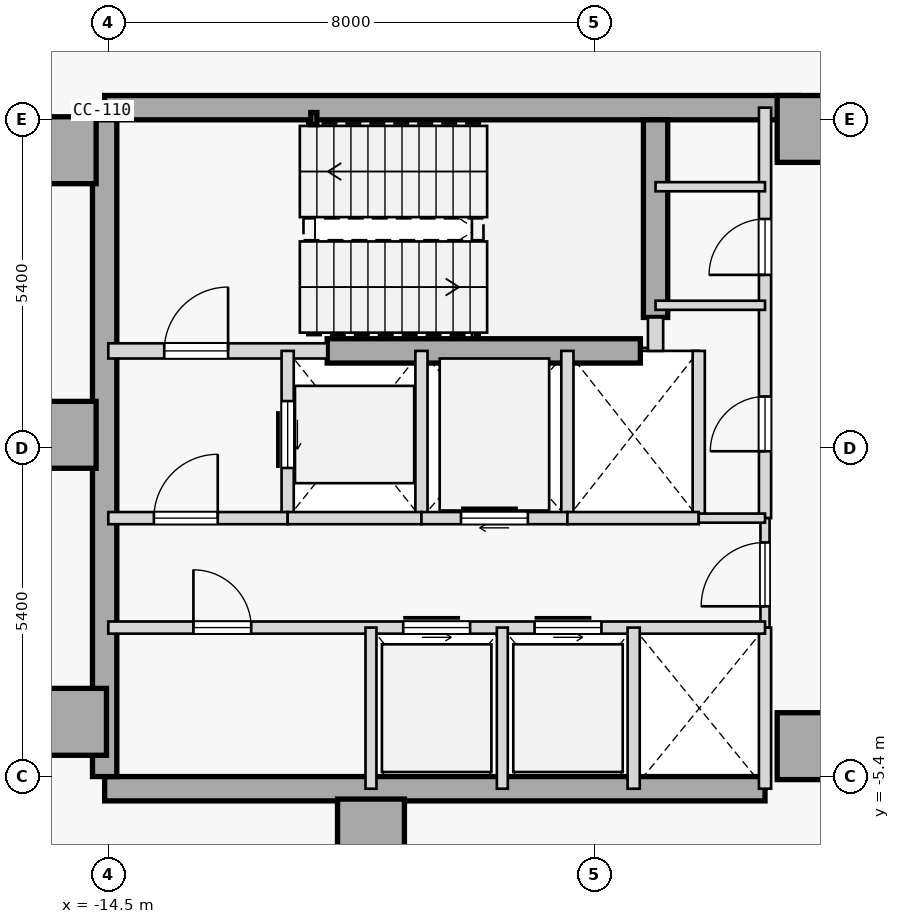
"""IFC4 building model, lengths in metres.
Left out: names, types, materials, properties, quantities, classifications, styles, units other than length and angle.
Written with IfcOpenShell. Run it as: python <this file> out.ifc"""

import sys

from ifc_helpers import new_model, si_unit, direction, frame, frame_2d, origin, origin_2d, place, context, subcontext, project, spatial, rectangle, hollow_rectangle, extrude, element, fill, save


model = new_model("IFC4")
c1 = context("Model", 3, precision=1e-05, world=origin(), true_north=direction((0.0, 1.0)))
c2 = subcontext(c1, "Body", "Model", "MODEL_VIEW")
j1 = project(units=[si_unit("LENGTHUNIT", "METRE"), si_unit("PLANEANGLEUNIT", "RADIAN")], contexts=[c1])
p1 = place(None, origin())
s1 = spatial("IfcSite", under=j1, at=p1, CompositionType="ELEMENT")
p2 = place(p1, origin())
s2 = spatial("IfcBuilding", under=s1, at=p2, CompositionType="ELEMENT")
p3 = place(p2, frame((0.0, 0.0, 147.3)))
s3 = spatial("IfcBuildingStorey", under=s2, at=p3, CompositionType="ELEMENT", Elevation=147.3)
for number, where, z_axis, x_axis in (
    (1, (-15.25, 4.9, 0.0), (0.0, 0.0, 1.0), (1.0, 0.0, 0.0)),
    (2, (-15.25, 0.22, 0.0), (0.0, 0.0, 1.0), (1.0, 0.0, 0.0)),
    (3, (-15.08, -4.5, 0.0), (0.0, 0.0, 1.0), (1.0, 0.0, 0.0)),
    (4, (-10.18, -6.32, 0.0), (0.0, 0.0, 1.0), (1.0, 0.0, 0.0)),
    (5, (-2.95, -4.9, 0.0), (0.0, 0.0, 1.0), (1.0, 0.0, 0.0)),
    (6, (-2.95, 5.25, 0.0), (0.0, 0.0, 1.0), (1.0, 0.0, 0.0)),
):
    element("IfcColumn", number, at=place(p3, frame(where, z_axis=z_axis, x_axis=x_axis)), inside=s3, PredefinedType="COLUMN", context=c2, shape_type="SweptSolid", body=[
        extrude(rectangle(XDim=1.1, YDim=1.1, at=origin_2d()), origin(), (0.0, 0.0, 1.0), 4.1),
    ])
p4 = place(p3, frame((-14.56, 5.6, 0.0), z_axis=(0.0, 0.0, 1.0), x_axis=(1.0, 0.0, 0.0)))
e7 = element("IfcWall", 7, at=p4, inside=s3, PredefinedType="SHEAR", context=c2, shape_type="SweptSolid", body=[
    extrude(rectangle(XDim=11.41, YDim=0.4, at=frame_2d((5.705, 0.0))), origin(), (0.0, 0.0, 1.0), 3.875),
])
p5 = place(p3, frame((-14.56, -5.6, 0.0), z_axis=(0.0, 0.0, 1.0), x_axis=(1.0, 0.0, 0.0)))
e8 = element("IfcWall", 8, at=p5, inside=s3, PredefinedType="SHEAR", context=c2, shape_type="SweptSolid", body=[
    extrude(rectangle(XDim=10.86, YDim=0.4, at=frame_2d((5.43, 0.0))), origin(), (0.0, 0.0, 1.0), 3.875),
])
p6 = place(p3, frame((-14.56, -5.4, 0.0), z_axis=(0.0, 0.0, 1.0), x_axis=(0.0, 1.0, 0.0)))
e9 = element("IfcWall", 9, at=p6, inside=s3, PredefinedType="SHEAR", context=c2, shape_type="SweptSolid", body=[
    extrude(rectangle(XDim=10.8, YDim=0.4, at=frame_2d((5.4, 0.0))), origin(), (0.0, 0.0, 1.0), 3.875),
])
p7 = place(p3, frame((-5.5, 2.15, 0.0), z_axis=(0.0, 0.0, 1.0), x_axis=(0.0, 1.0, 0.0)))
e10 = element("IfcWall", 10, at=p7, inside=s3, PredefinedType="SHEAR", context=c2, shape_type="SweptSolid", body=[
    extrude(rectangle(XDim=3.25, YDim=0.4, at=frame_2d((1.625, 0.0))), origin(), (0.0, 0.0, 1.0), 3.875),
])
p8 = place(p3, frame((-10.9, 1.6, 0.0), z_axis=(0.0, 0.0, 1.0), x_axis=(1.0, 0.0, 0.0)))
e11 = element("IfcWall", 11, at=p8, inside=s3, PredefinedType="SHEAR", context=c2, shape_type="SweptSolid", body=[
    extrude(rectangle(XDim=5.15, YDim=0.4, at=frame_2d((2.575, 0.0))), origin(), (0.0, 0.0, 1.0), 3.875),
])
p9 = place(p3, frame((-11.12, 5.42, 0.0), z_axis=(0.0, 0.0, 1.0), x_axis=(1.0, 0.0, 0.0)))
e12 = element("IfcColumn", 12, at=p9, inside=s3, PredefinedType="COLUMN", context=c2, shape_type="SweptSolid", body=[
    extrude(hollow_rectangle(XDim=0.1, YDim=0.2, WallThickness=0.008, at=origin_2d()), origin(), (0.0, 0.0, 1.0), 4.1),
])
p10 = place(p3, frame((-14.5, 1.6, 0.0), z_axis=(0.0, 0.0, 1.0), x_axis=(1.0, 0.0, 0.0)))
e13 = element("IfcWall", 13, at=p10, inside=s3, PredefinedType="STANDARD", context=c2, shape_type="SweptSolid", body=[
    extrude(rectangle(XDim=3.6, YDim=0.25, at=frame_2d((1.8, 0.0))), origin(), (0.0, 0.0, 1.0), 3.875),
])
p11 = place(p10, frame((0.92, 0.0, 0.0)))
e14 = element("IfcOpeningElement", 14, at=p11, cuts=e13, PredefinedType="OPENING", context=c2, shape_type="SweptSolid", body=[
    extrude(rectangle(XDim=1.05, YDim=2.15, at=frame_2d((0.525, 1.075))), frame((0.0, 0.135, 0.0), z_axis=(0.0, -1.0, 0.0), x_axis=(1.0, 0.0, 0.0)), (0.0, 0.0, 1.0), 0.27),
])
p12 = place(p3, frame((-5.5, 1.6, 0.0), z_axis=(0.0, 0.0, 1.0), x_axis=(0.0, 1.0, 0.0)))
e15 = element("IfcWall", 15, at=p12, inside=s3, PredefinedType="STANDARD", context=c2, shape_type="SweptSolid", body=[
    extrude(rectangle(XDim=0.55, YDim=0.25, at=frame_2d((0.275, 0.0))), origin(), (0.0, 0.0, 1.0), 3.875),
])
p13 = place(p3, frame((-3.7, -1.15, 0.0), z_axis=(0.0, 0.0, 1.0), x_axis=(0.0, 1.0, 0.0)))
e16 = element("IfcWall", 16, at=p13, inside=s3, PredefinedType="STANDARD", context=c2, shape_type="SweptSolid", body=[
    extrude(rectangle(XDim=6.75, YDim=0.2, at=frame_2d((3.375, 0.0))), origin(), (0.0, 0.0, 1.0), 3.875),
])
p14 = place(p13, frame((1.1, 0.0, 0.0)))
e17 = element("IfcOpeningElement", 17, at=p14, cuts=e16, PredefinedType="OPENING", context=c2, shape_type="SweptSolid", body=[
    extrude(rectangle(XDim=0.9, YDim=2.15, at=frame_2d((0.45, 1.075))), frame((0.0, 0.11, 0.0), z_axis=(0.0, -1.0, 0.0), x_axis=(1.0, 0.0, 0.0)), (0.0, 0.0, 1.0), 0.22),
])
p15 = place(p13, frame((4.0, 0.0, 0.0)))
e18 = element("IfcOpeningElement", 18, at=p15, cuts=e16, PredefinedType="OPENING", context=c2, shape_type="SweptSolid", body=[
    extrude(rectangle(XDim=0.92, YDim=2.15, at=frame_2d((0.46, 1.075))), frame((0.0, 0.11, 0.0), z_axis=(0.0, -1.0, 0.0), x_axis=(1.0, 0.0, 0.0)), (0.0, 0.0, 1.0), 0.22),
])
p16 = place(p3, frame((-3.7, -2.95, 0.0), z_axis=(0.0, 0.0, 1.0), x_axis=(0.0, 1.0, 0.0)))
e19 = element("IfcWall", 19, at=p16, inside=s3, PredefinedType="PARTITIONING", context=c2, shape_type="SweptSolid", body=[
    extrude(rectangle(XDim=1.8, YDim=0.15, at=frame_2d((0.9, 0.0))), origin(), (0.0, 0.0, 1.0), 3.875),
])
p17 = place(p16, frame((0.35, 0.0, 0.0)))
e20 = element("IfcOpeningElement", 20, at=p17, cuts=e19, PredefinedType="OPENING", context=c2, shape_type="SweptSolid", body=[
    extrude(rectangle(XDim=1.05, YDim=2.18, at=frame_2d((0.525, 1.09))), frame((0.0, 0.085, 0.0), z_axis=(0.0, -1.0, 0.0), x_axis=(1.0, 0.0, 0.0)), (0.0, 0.0, 1.0), 0.17),
])
p18 = place(p3, frame((-3.7, -5.6, 0.0), z_axis=(0.0, 0.0, 1.0), x_axis=(0.0, 1.0, 0.0)))
e21 = element("IfcWall", 21, at=p18, inside=s3, PredefinedType="STANDARD", context=c2, shape_type="SweptSolid", body=[
    extrude(rectangle(XDim=2.65, YDim=0.2, at=frame_2d((1.325, 0.0))), origin(), (0.0, 0.0, 1.0), 3.875),
])
p19 = place(p3, frame((-11.55, -1.15, 0.0), z_axis=(0.0, 0.0, 1.0), x_axis=(0.0, 1.0, 0.0)))
e22 = element("IfcWall", 22, at=p19, inside=s3, PredefinedType="STANDARD", context=c2, shape_type="SweptSolid", body=[
    extrude(rectangle(XDim=2.75, YDim=0.2, at=frame_2d((1.375, 0.0))), origin(), (0.0, 0.0, 1.0), 3.875),
])
p20 = place(p19, frame((0.825, 0.0, 0.0)))
e23 = element("IfcOpeningElement", 23, at=p20, cuts=e22, PredefinedType="OPENING", context=c2, shape_type="SweptSolid", body=[
    extrude(rectangle(XDim=1.1, YDim=2.15, at=frame_2d((0.55, 1.075))), frame((0.0, 0.11, 0.0), z_axis=(0.0, -1.0, 0.0), x_axis=(1.0, 0.0, 0.0)), (0.0, 0.0, 1.0), 0.22),
])
p21 = place(p3, frame((-9.35, -1.15, 0.0), z_axis=(0.0, 0.0, 1.0), x_axis=(0.0, 1.0, 0.0)))
e24 = element("IfcWall", 24, at=p21, inside=s3, PredefinedType="STANDARD", context=c2, shape_type="SweptSolid", body=[
    extrude(rectangle(XDim=2.75, YDim=0.2, at=frame_2d((1.375, 0.0))), origin(), (0.0, 0.0, 1.0), 3.875),
])
p22 = place(p3, frame((-14.5, -1.15, 0.0), z_axis=(0.0, 0.0, 1.0), x_axis=(1.0, 0.0, 0.0)))
e25 = element("IfcWall", 25, at=p22, inside=s3, PredefinedType="STANDARD", context=c2, shape_type="SweptSolid", body=[
    extrude(rectangle(XDim=2.95, YDim=0.2, at=frame_2d((1.475, 0.0))), origin(), (0.0, 0.0, 1.0), 3.875),
])
p23 = place(p22, frame((0.75, 0.0, 0.0)))
e26 = element("IfcOpeningElement", 26, at=p23, cuts=e25, PredefinedType="OPENING", context=c2, shape_type="SweptSolid", body=[
    extrude(rectangle(XDim=1.05, YDim=2.18, at=frame_2d((0.525, 1.09))), frame((0.0, 0.11, 0.0), z_axis=(0.0, -1.0, 0.0), x_axis=(1.0, 0.0, 0.0)), (0.0, 0.0, 1.0), 0.22),
])
p24 = place(p3, frame((-11.55, -1.15, 0.0), z_axis=(0.0, 0.0, 1.0), x_axis=(1.0, 0.0, 0.0)))
e27 = element("IfcWall", 27, at=p24, inside=s3, PredefinedType="STANDARD", context=c2, shape_type="SweptSolid", body=[
    extrude(rectangle(XDim=2.2, YDim=0.2, at=frame_2d((1.1, 0.0))), origin(), (0.0, 0.0, 1.0), 3.875),
])
p25 = place(p3, frame((-6.95, -1.15, 0.0), z_axis=(0.0, 0.0, 1.0), x_axis=(0.0, 1.0, 0.0)))
e28 = element("IfcWall", 28, at=p25, inside=s3, PredefinedType="STANDARD", context=c2, shape_type="SweptSolid", body=[
    extrude(rectangle(XDim=2.75, YDim=0.2, at=frame_2d((1.375, 0.0))), origin(), (0.0, 0.0, 1.0), 3.875),
])
p26 = place(p3, frame((-9.35, -1.15, 0.0), z_axis=(0.0, 0.0, 1.0), x_axis=(1.0, 0.0, 0.0)))
e29 = element("IfcWall", 29, at=p26, inside=s3, PredefinedType="STANDARD", context=c2, shape_type="SweptSolid", body=[
    extrude(rectangle(XDim=2.4, YDim=0.2, at=frame_2d((1.2, 0.0))), origin(), (0.0, 0.0, 1.0), 3.875),
])
p27 = place(p26, frame((0.65, 0.0, 0.0)))
e30 = element("IfcOpeningElement", 30, at=p27, cuts=e29, PredefinedType="OPENING", context=c2, shape_type="SweptSolid", body=[
    extrude(rectangle(XDim=1.1, YDim=2.15, at=frame_2d((0.55, 1.075))), frame((0.0, 0.11, 0.0), z_axis=(0.0, -1.0, 0.0), x_axis=(1.0, 0.0, 0.0)), (0.0, 0.0, 1.0), 0.22),
])
p28 = place(p3, frame((-4.79, -1.15, 0.0), z_axis=(0.0, 0.0, 1.0), x_axis=(0.0, 1.0, 0.0)))
e31 = element("IfcWall", 31, at=p28, inside=s3, PredefinedType="STANDARD", context=c2, shape_type="SweptSolid", body=[
    extrude(rectangle(XDim=2.75, YDim=0.2, at=frame_2d((1.375, 0.0))), origin(), (0.0, 0.0, 1.0), 3.875),
])
p29 = place(p3, frame((-6.95, -1.15, 0.0), z_axis=(0.0, 0.0, 1.0), x_axis=(1.0, 0.0, 0.0)))
e32 = element("IfcWall", 32, at=p29, inside=s3, PredefinedType="STANDARD", context=c2, shape_type="SweptSolid", body=[
    extrude(rectangle(XDim=2.16, YDim=0.2, at=frame_2d((1.08, 0.0))), origin(), (0.0, 0.0, 1.0), 3.875),
])
p30 = place(p3, frame((-4.79, -1.15, 0.0), z_axis=(0.0, 0.0, 1.0), x_axis=(1.0, 0.0, 0.0)))
e33 = element("IfcWall", 33, at=p30, inside=s3, PredefinedType="PARTITIONING", context=c2, shape_type="SweptSolid", body=[
    extrude(rectangle(XDim=1.09, YDim=0.15, at=frame_2d((0.545, 0.0))), origin(), (0.0, 0.0, 1.0), 3.875),
])
p31 = place(p3, frame((-14.5, -2.95, 0.0), z_axis=(0.0, 0.0, 1.0), x_axis=(1.0, 0.0, 0.0)))
e34 = element("IfcWall", 34, at=p31, inside=s3, PredefinedType="STANDARD", context=c2, shape_type="SweptSolid", body=[
    extrude(rectangle(XDim=10.8, YDim=0.2, at=frame_2d((5.4, 0.0))), origin(), (0.0, 0.0, 1.0), 3.875),
])
p32 = place(p31, frame((4.85, 0.0, 0.0)))
e35 = element("IfcOpeningElement", 35, at=p32, cuts=e34, PredefinedType="OPENING", context=c2, shape_type="SweptSolid", body=[
    extrude(rectangle(XDim=1.1, YDim=2.15, at=frame_2d((0.55, 1.075))), frame((0.0, 0.11, 0.0), z_axis=(0.0, -1.0, 0.0), x_axis=(1.0, 0.0, 0.0)), (0.0, 0.0, 1.0), 0.22),
])
p33 = place(p31, frame((7.01, 0.0, 0.0)))
e36 = element("IfcOpeningElement", 36, at=p33, cuts=e34, PredefinedType="OPENING", context=c2, shape_type="SweptSolid", body=[
    extrude(rectangle(XDim=1.1, YDim=2.15, at=frame_2d((0.55, 1.075))), frame((0.0, 0.11, 0.0), z_axis=(0.0, -1.0, 0.0), x_axis=(1.0, 0.0, 0.0)), (0.0, 0.0, 1.0), 0.22),
])
p34 = place(p31, frame((1.4, 0.0, 0.0)))
e37 = element("IfcOpeningElement", 37, at=p34, cuts=e34, PredefinedType="OPENING", context=c2, shape_type="SweptSolid", body=[
    extrude(rectangle(XDim=0.95, YDim=2.15, at=frame_2d((0.475, 1.075))), frame((0.0, 0.11, 0.0), z_axis=(0.0, -1.0, 0.0), x_axis=(1.0, 0.0, 0.0)), (0.0, 0.0, 1.0), 0.22),
])
p35 = place(p3, frame((-5.86, -5.6, 0.0), z_axis=(0.0, 0.0, 1.0), x_axis=(0.0, 1.0, 0.0)))
e38 = element("IfcWall", 38, at=p35, inside=s3, PredefinedType="STANDARD", context=c2, shape_type="SweptSolid", body=[
    extrude(rectangle(XDim=2.65, YDim=0.2, at=frame_2d((1.325, 0.0))), origin(), (0.0, 0.0, 1.0), 3.875),
])
for number, where, z_axis, x_axis in (
    (39, (-10.18, -5.6, 0.0), (0.0, 0.0, 1.0), (0.0, 1.0, 0.0)),
    (40, (-8.02, -5.6, 0.0), (0.0, 0.0, 1.0), (0.0, 1.0, 0.0)),
):
    element("IfcWall", number, at=place(p3, frame(where, z_axis=z_axis, x_axis=x_axis)), inside=s3, PredefinedType="STANDARD", context=c2, shape_type="SweptSolid", body=[
        extrude(rectangle(XDim=2.65, YDim=0.18, at=frame_2d((1.325, 0.0))), origin(), (0.0, 0.0, 1.0), 3.875),
    ])
for number, where, z_axis, x_axis in (
    (41, (-5.5, 4.3, 0.0), (0.0, 0.0, 1.0), (1.0, 0.0, 0.0)),
    (42, (-5.5, 2.35, 0.0), (0.0, 0.0, 1.0), (1.0, 0.0, 0.0)),
):
    element("IfcWall", number, at=place(p3, frame(where, z_axis=z_axis, x_axis=x_axis)), inside=s3, PredefinedType="PARTITIONING", context=c2, shape_type="SweptSolid", body=[
        extrude(rectangle(XDim=1.8, YDim=0.15, at=frame_2d((0.9, 0.0))), origin(), (0.0, 0.0, 1.0), 3.875),
    ])
p36 = place(p3, frame((-19.217, 6.489, 0.0), z_axis=(0.0, 0.0, 1.0), x_axis=(0.978147578989, 0.207911793121, 0.0)))
e43 = element("IfcWall", 43, at=p36, inside=s3, PredefinedType="PARTITIONING", context=c2, shape_type="SweptSolid", body=[
    extrude(rectangle(XDim=12.332, YDim=0.15, at=frame_2d((6.166, 0.0))), origin(), (0.0, 0.0, 1.0), 3.875),
])
p37 = place(p36, frame((5.691, 0.0, 0.0)))
e44 = element("IfcOpeningElement", 44, at=p37, cuts=e43, PredefinedType="OPENING", context=c2, shape_type="SweptSolid", body=[
    extrude(rectangle(XDim=0.95, YDim=2.15, at=frame_2d((0.475, 1.075))), frame((0.0, 0.085, 0.0), z_axis=(0.0, -1.0, 0.0), x_axis=(1.0, 0.0, 0.0)), (0.0, 0.0, 1.0), 0.17),
])
p38 = place(p11, origin())
e45 = element("IfcDoor", 45, at=p38, inside=s3, OperationType="SINGLE_SWING_RIGHT", PredefinedType="DOOR", context=c2, shape_type="SweptSolid", body=[
    extrude(rectangle(XDim=1.05, YDim=2.15, at=frame_2d((0.525, 1.075))), frame((0.0, 0.025, 0.0), z_axis=(0.0, -1.0, 0.0), x_axis=(1.0, 0.0, 0.0)), (0.0, 0.0, 1.0), 0.05),
])
fill(e14, e45)
p39 = place(p23, origin())
e46 = element("IfcDoor", 46, at=p39, inside=s3, OperationType="SINGLE_SWING_RIGHT", PredefinedType="DOOR", context=c2, shape_type="SweptSolid", body=[
    extrude(rectangle(XDim=1.05, YDim=2.18, at=frame_2d((0.525, 1.09))), frame((0.0, 0.025, 0.0), z_axis=(0.0, -1.0, 0.0), x_axis=(1.0, 0.0, 0.0)), (0.0, 0.0, 1.0), 0.05),
])
fill(e26, e46)
p40 = place(p17, origin())
e47 = element("IfcDoor", 47, at=p40, inside=s3, OperationType="SINGLE_SWING_LEFT", PredefinedType="DOOR", context=c2, shape_type="SweptSolid", body=[
    extrude(rectangle(XDim=1.05, YDim=2.18, at=frame_2d((0.525, 1.09))), frame((0.0, 0.025, 0.0), z_axis=(0.0, -1.0, 0.0), x_axis=(1.0, 0.0, 0.0)), (0.0, 0.0, 1.0), 0.05),
])
fill(e20, e47)
p41 = place(p20, origin())
e48 = element("IfcDoor", 48, at=p41, inside=s3, OperationType="SLIDING_TO_RIGHT", PredefinedType="DOOR", context=c2, shape_type="SweptSolid", body=[
    extrude(rectangle(XDim=1.1, YDim=2.15, at=frame_2d((0.55, 1.075))), frame((0.0, 0.025, 0.0), z_axis=(0.0, -1.0, 0.0), x_axis=(1.0, 0.0, 0.0)), (0.0, 0.0, 1.0), 0.05),
])
fill(e23, e48)
p42 = place(p27, origin())
e49 = element("IfcDoor", 49, at=p42, inside=s3, OperationType="SLIDING_TO_RIGHT", PredefinedType="DOOR", context=c2, shape_type="SweptSolid", body=[
    extrude(rectangle(XDim=1.1, YDim=2.15, at=frame_2d((0.55, 1.075))), frame((0.0, 0.025, 0.0), z_axis=(0.0, -1.0, 0.0), x_axis=(1.0, 0.0, 0.0)), (0.0, 0.0, 1.0), 0.05),
])
fill(e30, e49)
p43 = place(p32, origin())
e50 = element("IfcDoor", 50, at=p43, inside=s3, OperationType="SLIDING_TO_LEFT", PredefinedType="DOOR", context=c2, shape_type="SweptSolid", body=[
    extrude(rectangle(XDim=1.1, YDim=2.15, at=frame_2d((0.55, 1.075))), frame((0.0, 0.025, 0.0), z_axis=(0.0, -1.0, 0.0), x_axis=(1.0, 0.0, 0.0)), (0.0, 0.0, 1.0), 0.05),
])
fill(e35, e50)
p44 = place(p33, origin())
e51 = element("IfcDoor", 51, at=p44, inside=s3, OperationType="SLIDING_TO_LEFT", PredefinedType="DOOR", context=c2, shape_type="SweptSolid", body=[
    extrude(rectangle(XDim=1.1, YDim=2.15, at=frame_2d((0.55, 1.075))), frame((0.0, 0.025, 0.0), z_axis=(0.0, -1.0, 0.0), x_axis=(1.0, 0.0, 0.0)), (0.0, 0.0, 1.0), 0.05),
])
fill(e36, e51)
p45 = place(p34, origin())
e52 = element("IfcDoor", 52, at=p45, inside=s3, OperationType="SINGLE_SWING_LEFT", PredefinedType="DOOR", context=c2, shape_type="SweptSolid", body=[
    extrude(rectangle(XDim=0.95, YDim=2.15, at=frame_2d((0.475, 1.075))), frame((0.0, 0.025, 0.0), z_axis=(0.0, -1.0, 0.0), x_axis=(1.0, 0.0, 0.0)), (0.0, 0.0, 1.0), 0.05),
])
fill(e37, e52)
p46 = place(p14, origin())
e53 = element("IfcDoor", 53, at=p46, inside=s3, OperationType="SINGLE_SWING_LEFT", PredefinedType="DOOR", context=c2, shape_type="SweptSolid", body=[
    extrude(rectangle(XDim=0.9, YDim=2.15, at=frame_2d((0.45, 1.075))), frame((0.0, 0.025, 0.0), z_axis=(0.0, -1.0, 0.0), x_axis=(1.0, 0.0, 0.0)), (0.0, 0.0, 1.0), 0.05),
])
fill(e17, e53)
p47 = place(p15, origin())
e54 = element("IfcDoor", 54, at=p47, inside=s3, OperationType="SINGLE_SWING_LEFT", PredefinedType="DOOR", context=c2, shape_type="SweptSolid", body=[
    extrude(rectangle(XDim=0.92, YDim=2.15, at=frame_2d((0.46, 1.075))), frame((0.0, 0.025, 0.0), z_axis=(0.0, -1.0, 0.0), x_axis=(1.0, 0.0, 0.0)), (0.0, 0.0, 1.0), 0.05),
])
fill(e18, e54)
save(model, sys.argv[1])
